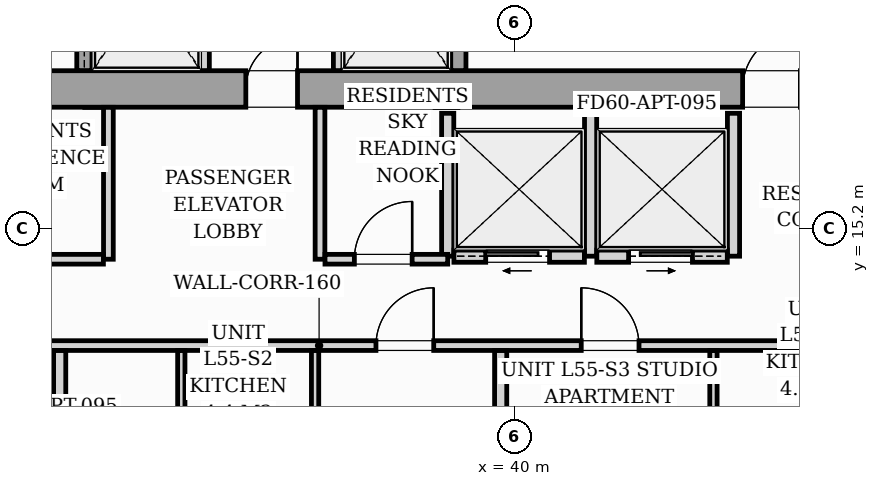
"""IFC4 building model, lengths in metres.
Left out: names, types, materials, properties, quantities, classifications, styles, units other than length and angle.
Written with IfcOpenShell. Run it as: python <this file> out.ifc"""

import sys

from ifc_helpers import new_model, si_unit, direction, frame, frame_2d, origin, origin_2d, place, context, subcontext, project, spatial, rectangle, i_section, extrude, source, transform, mapped, element, fill, save


model = new_model("IFC4")
c1 = context("Model", 3, precision=1e-05, world=origin(), true_north=direction((0.0, 1.0)))
c2 = subcontext(c1, "Body", "Model", "MODEL_VIEW")
j1 = project(units=[si_unit("LENGTHUNIT", "METRE"), si_unit("PLANEANGLEUNIT", "RADIAN")], contexts=[c1])
p1 = place(None, origin())
s1 = spatial("IfcSite", under=j1, at=p1, CompositionType="ELEMENT")
p2 = place(p1, origin())
s2 = spatial("IfcBuilding", under=s1, at=p2, CompositionType="ELEMENT")
p3 = place(p2, frame((0.0, 0.0, 192.2)))
s3 = spatial("IfcBuildingStorey", under=s2, at=p3, CompositionType="ELEMENT", Elevation=192.2)
m1 = source(origin(), c2, "Body", "SweptSolid", [
    extrude(i_section(OverallWidth=0.416, OverallDepth=0.446, WebThickness=0.039, FlangeThickness=0.063, FilletRadius=0.018, at=origin_2d()), origin(), (0.0, 0.0, 1.0), 3.196),
])
for number, where, z_axis, x_axis in (
    (1, (33.12, 17.4, 0.002), (0.0, 0.0, 1.0), (1.0, 0.0, 0.0)),
    (2, (38.88, 17.4, 0.002), (0.0, 0.0, 1.0), (1.0, 0.0, 0.0)),
):
    element("IfcColumn", number, at=place(p3, frame(where, z_axis=z_axis, x_axis=x_axis)), inside=s3, PredefinedType="PILASTER", context=c2, shape_type="MappedRepresentation", body=[
        mapped(m1, transform((0.0, 0.0, 0.0), scale=1.0)),
    ])
p4 = place(p3, frame((26.2, 17.5, 0.0), z_axis=(0.0, 0.0, 1.0), x_axis=(1.0, 0.0, 0.0)))
e3 = element("IfcWall", 3, at=p4, inside=s3, PredefinedType="SHEAR", context=c2, shape_type="SweptSolid", body=[
    extrude(rectangle(XDim=19.6, YDim=0.6, at=frame_2d((9.8, 0.0))), origin(), (0.0, 0.0, 1.0), 3.2),
])
p5 = place(p4, frame((0.95, 0.0, 0.0)))
e4 = element("IfcOpeningElement", 4, at=p5, cuts=e3, PredefinedType="OPENING", context=c2, shape_type="SweptSolid", body=[
    extrude(rectangle(XDim=0.95, YDim=2.06, at=frame_2d((0.475, 1.03))), frame((0.0, 0.31, 0.0), z_axis=(0.0, -1.0, 0.0), x_axis=(1.0, 0.0, 0.0)), (0.0, 0.0, 1.0), 0.62),
])
p6 = place(p4, frame((9.38, 0.0, 0.0)))
e5 = element("IfcOpeningElement", 5, at=p6, cuts=e3, PredefinedType="OPENING", context=c2, shape_type="SweptSolid", body=[
    extrude(rectangle(XDim=0.85, YDim=2.0, at=frame_2d((0.425, 1.0))), frame((0.0, 0.31, 0.0), z_axis=(0.0, -1.0, 0.0), x_axis=(1.0, 0.0, 0.0)), (0.0, 0.0, 1.0), 0.62),
])
p7 = place(p4, frame((17.55, 0.0, 0.0)))
e6 = element("IfcOpeningElement", 6, at=p7, cuts=e3, PredefinedType="OPENING", context=c2, shape_type="SweptSolid", body=[
    extrude(rectangle(XDim=0.95, YDim=2.06, at=frame_2d((0.475, 1.03))), frame((0.0, 0.31, 0.0), z_axis=(0.0, -1.0, 0.0), x_axis=(1.0, 0.0, 0.0)), (0.0, 0.0, 1.0), 0.62),
])
p8 = place(p3, frame((32.925, 17.802, 0.0), z_axis=(0.0, 0.0, 1.0), x_axis=(0.0, 1.0, 0.0)))
e7 = element("IfcWall", 7, at=p8, inside=s3, PredefinedType="SOLIDWALL", context=c2, shape_type="SweptSolid", body=[
    extrude(rectangle(XDim=2.646, YDim=0.25, at=frame_2d((1.323, 0.0))), origin(), (0.0, 0.0, 1.0), 3.2),
])
p9 = place(p8, frame((0.548, 0.0, 0.0)))
e8 = element("IfcOpeningElement", 8, at=p9, cuts=e7, PredefinedType="OPENING", context=c2, shape_type="SweptSolid", body=[
    extrude(rectangle(XDim=1.1, YDim=2.08, at=frame_2d((0.55, 1.04))), frame((0.0, 0.135, 0.0), z_axis=(0.0, -1.0, 0.0), x_axis=(1.0, 0.0, 0.0)), (0.0, 0.0, 1.0), 0.27),
])
for number, where, z_axis, x_axis in (
    (9, (34.9, 17.802, 0.0), (0.0, 0.0, 1.0), (0.0, 1.0, 0.0)),
    (10, (37.1, 17.802, 0.0), (0.0, 0.0, 1.0), (0.0, 1.0, 0.0)),
):
    element("IfcWall", number, at=place(p3, frame(where, z_axis=z_axis, x_axis=x_axis)), inside=s3, PredefinedType="PARTITIONING", context=c2, shape_type="SweptSolid", body=[
        extrude(rectangle(XDim=2.646, YDim=0.16, at=frame_2d((1.323, 0.0))), origin(), (0.0, 0.0, 1.0), 2.94),
    ])
p10 = place(p3, frame((39.075, 17.802, 0.0), z_axis=(0.0, 0.0, 1.0), x_axis=(0.0, 1.0, 0.0)))
e11 = element("IfcWall", 11, at=p10, inside=s3, PredefinedType="SOLIDWALL", context=c2, shape_type="SweptSolid", body=[
    extrude(rectangle(XDim=2.646, YDim=0.25, at=frame_2d((1.323, 0.0))), origin(), (0.0, 0.0, 1.0), 3.2),
])
p11 = place(p10, frame((0.548, 0.0, 0.0)))
e12 = element("IfcOpeningElement", 12, at=p11, cuts=e11, PredefinedType="OPENING", context=c2, shape_type="SweptSolid", body=[
    extrude(rectangle(XDim=1.1, YDim=2.08, at=frame_2d((0.55, 1.04))), frame((0.0, 0.135, 0.0), z_axis=(0.0, -1.0, 0.0), x_axis=(1.0, 0.0, 0.0)), (0.0, 0.0, 1.0), 0.27),
])
for number, where, z_axis, x_axis in (
    (13, (38.9, 14.75, 0.0), (0.0, 0.0, 1.0), (0.0, 1.0, 0.0)),
    (14, (41.25, 14.75, 0.0), (0.0, 0.0, 1.0), (0.0, 1.0, 0.0)),
    (15, (43.6, 14.75, 0.0), (0.0, 0.0, 1.0), (0.0, 1.0, 0.0)),
):
    element("IfcWall", number, at=place(p3, frame(where, z_axis=z_axis, x_axis=x_axis)), inside=s3, PredefinedType="PARTITIONING", context=c2, shape_type="SweptSolid", body=[
        extrude(rectangle(XDim=2.35, YDim=0.2, at=frame_2d((1.175, 0.0))), origin(), (0.0, 0.0, 1.0), 2.94),
    ])
p12 = place(p3, frame((39.002, 14.75, 0.0), z_axis=(0.0, 0.0, 1.0), x_axis=(1.0, 0.0, 0.0)))
e16 = element("IfcWall", 16, at=p12, inside=s3, PredefinedType="PARTITIONING", context=c2, shape_type="SweptSolid", body=[
    extrude(rectangle(XDim=2.146, YDim=0.2, at=frame_2d((1.073, 0.0))), origin(), (0.0, 0.0, 1.0), 2.94),
])
p13 = place(p12, frame((0.523, 0.0, 0.0)))
e17 = element("IfcOpeningElement", 17, at=p13, cuts=e16, PredefinedType="OPENING", context=c2, shape_type="SweptSolid", body=[
    extrude(rectangle(XDim=1.05, YDim=2.08, at=frame_2d((0.525, 1.04))), frame((0.0, 0.11, 0.0), z_axis=(0.0, -1.0, 0.0), x_axis=(1.0, 0.0, 0.0)), (0.0, 0.0, 1.0), 0.22),
])
p14 = place(p3, frame((41.352, 14.75, 0.0), z_axis=(0.0, 0.0, 1.0), x_axis=(1.0, 0.0, 0.0)))
e18 = element("IfcWall", 18, at=p14, inside=s3, PredefinedType="PARTITIONING", context=c2, shape_type="SweptSolid", body=[
    extrude(rectangle(XDim=2.146, YDim=0.2, at=frame_2d((1.073, 0.0))), origin(), (0.0, 0.0, 1.0), 2.94),
])
p15 = place(p14, frame((0.523, 0.0, 0.0)))
e19 = element("IfcOpeningElement", 19, at=p15, cuts=e18, PredefinedType="OPENING", context=c2, shape_type="SweptSolid", body=[
    extrude(rectangle(XDim=1.05, YDim=2.08, at=frame_2d((0.525, 1.04))), frame((0.0, 0.11, 0.0), z_axis=(0.0, -1.0, 0.0), x_axis=(1.0, 0.0, 0.0)), (0.0, 0.0, 1.0), 0.22),
])
p16 = place(p3, frame((26.12, 13.28, 0.0), z_axis=(0.0, 0.0, 1.0), x_axis=(1.0, 0.0, 0.0)))
e20 = element("IfcWall", 20, at=p16, inside=s3, PredefinedType="PARTITIONING", context=c2, shape_type="SweptSolid", body=[
    extrude(rectangle(XDim=21.33, YDim=0.16, at=frame_2d((10.665, 0.0))), origin(), (0.0, 0.0, 1.0), 2.94),
])
p17 = place(p16, frame((4.704, 0.0, 0.0)))
e21 = element("IfcOpeningElement", 21, at=p17, cuts=e20, PredefinedType="OPENING", context=c2, shape_type="SweptSolid", body=[
    extrude(rectangle(XDim=0.95, YDim=2.06, at=frame_2d((0.475, 1.03))), frame((0.0, 0.09, 0.0), z_axis=(0.0, -1.0, 0.0), x_axis=(1.0, 0.0, 0.0)), (0.0, 0.0, 1.0), 0.18),
])
p18 = place(p16, frame((11.6, 0.0, 0.0)))
e22 = element("IfcOpeningElement", 22, at=p18, cuts=e20, PredefinedType="OPENING", context=c2, shape_type="SweptSolid", body=[
    extrude(rectangle(XDim=0.95, YDim=2.06, at=frame_2d((0.475, 1.03))), frame((0.0, 0.09, 0.0), z_axis=(0.0, -1.0, 0.0), x_axis=(1.0, 0.0, 0.0)), (0.0, 0.0, 1.0), 0.18),
])
p19 = place(p16, frame((14.976, 0.0, 0.0)))
e23 = element("IfcOpeningElement", 23, at=p19, cuts=e20, PredefinedType="OPENING", context=c2, shape_type="SweptSolid", body=[
    extrude(rectangle(XDim=0.95, YDim=2.06, at=frame_2d((0.475, 1.03))), frame((0.0, 0.09, 0.0), z_axis=(0.0, -1.0, 0.0), x_axis=(1.0, 0.0, 0.0)), (0.0, 0.0, 1.0), 0.18),
])
p20 = place(p3, frame((32.519, 7.877, 0.0), z_axis=(0.0, 0.0, 1.0), x_axis=(0.0, 1.0, 0.0)))
e24 = element("IfcWall", 24, at=p20, inside=s3, PredefinedType="PARTITIONING", context=c2, shape_type="SweptSolid", body=[
    extrude(rectangle(XDim=5.321, YDim=0.2, at=frame_2d((2.66, 0.0))), origin(), (0.0, 0.0, 1.0), 2.94),
])
for number, where, z_axis, x_axis in (
    (25, (36.719, 11.092, 0.0), (0.0, 0.0, 1.0), (0.0, 1.0, 0.0)),
    (26, (34.519, 11.092, 0.0), (0.0, 0.0, 1.0), (0.0, 1.0, 0.0)),
):
    element("IfcWall", number, at=place(p3, frame(where, z_axis=z_axis, x_axis=x_axis)), inside=s3, PredefinedType="PARTITIONING", context=c2, shape_type="SweptSolid", body=[
        extrude(rectangle(XDim=2.106, YDim=0.12, at=frame_2d((1.053, 0.0))), origin(), (0.0, 0.0, 1.0), 2.94),
    ])
p21 = place(p3, frame((39.771, 8.393, 0.0), z_axis=(0.0, 0.0, 1.0), x_axis=(0.0, 1.0, 0.0)))
e27 = element("IfcWall", 27, at=p21, inside=s3, PredefinedType="PARTITIONING", context=c2, shape_type="SweptSolid", body=[
    extrude(rectangle(XDim=4.805, YDim=0.2, at=frame_2d((2.403, 0.0))), origin(), (0.0, 0.0, 1.0), 2.94),
])
p22 = place(p3, frame((43.27, 11.234, 0.0), z_axis=(0.0, 0.0, 1.0), x_axis=(0.0, 1.0, 0.0)))
e28 = element("IfcWall", 28, at=p22, inside=s3, PredefinedType="PARTITIONING", context=c2, shape_type="SweptSolid", body=[
    extrude(rectangle(XDim=1.964, YDim=0.12, at=frame_2d((0.982, 0.0))), origin(), (0.0, 0.0, 1.0), 2.94),
])
p23 = place(p3, frame((33.32, 14.7, 0.0), z_axis=(0.0, 0.0, 1.0), x_axis=(0.0, 1.0, 0.0)))
e29 = element("IfcWall", 29, at=p23, inside=s3, PredefinedType="PARTITIONING", context=c2, shape_type="SweptSolid", body=[
    extrude(rectangle(XDim=2.498, YDim=0.16, at=frame_2d((1.249, 0.0))), origin(), (0.0, 0.0, 1.0), 2.94),
])
p24 = place(p3, frame((28.442, 14.7, 0.0), z_axis=(0.0, 0.0, 1.0), x_axis=(1.0, 0.0, 0.0)))
e30 = element("IfcWall", 30, at=p24, inside=s3, PredefinedType="PARTITIONING", context=c2, shape_type="SweptSolid", body=[
    extrude(rectangle(XDim=4.796, YDim=0.16, at=frame_2d((2.398, 0.0))), origin(), (0.0, 0.0, 1.0), 2.94),
])
p25 = place(p24, frame((1.923, 0.0, 0.0)))
e31 = element("IfcOpeningElement", 31, at=p25, cuts=e30, PredefinedType="OPENING", context=c2, shape_type="SweptSolid", body=[
    extrude(rectangle(XDim=0.95, YDim=2.06, at=frame_2d((0.475, 1.03))), frame((0.0, 0.09, 0.0), z_axis=(0.0, -1.0, 0.0), x_axis=(1.0, 0.0, 0.0)), (0.0, 0.0, 1.0), 0.18),
])
p26 = place(p3, frame((36.8, 14.7, 0.0), z_axis=(0.0, 0.0, 1.0), x_axis=(0.0, 1.0, 0.0)))
e32 = element("IfcWall", 32, at=p26, inside=s3, PredefinedType="PARTITIONING", context=c2, shape_type="SweptSolid", body=[
    extrude(rectangle(XDim=2.498, YDim=0.16, at=frame_2d((1.249, 0.0))), origin(), (0.0, 0.0, 1.0), 2.94),
])
p27 = place(p3, frame((36.882, 14.7, 0.0), z_axis=(0.0, 0.0, 1.0), x_axis=(1.0, 0.0, 0.0)))
e33 = element("IfcWall", 33, at=p27, inside=s3, PredefinedType="PARTITIONING", context=c2, shape_type="SweptSolid", body=[
    extrude(rectangle(XDim=2.018, YDim=0.16, at=frame_2d((1.009, 0.0))), origin(), (0.0, 0.0, 1.0), 2.94),
])
p28 = place(p27, frame((0.483, 0.0, 0.0)))
e34 = element("IfcOpeningElement", 34, at=p28, cuts=e33, PredefinedType="OPENING", context=c2, shape_type="SweptSolid", body=[
    extrude(rectangle(XDim=0.95, YDim=2.06, at=frame_2d((0.475, 1.03))), frame((0.0, 0.09, 0.0), z_axis=(0.0, -1.0, 0.0), x_axis=(1.0, 0.0, 0.0)), (0.0, 0.0, 1.0), 0.18),
])
m2 = source(origin(), c2, "Body", "SweptSolid", [
    extrude(rectangle(XDim=0.85, YDim=2.0, at=frame_2d((0.425, 1.0))), frame((0.0, 0.025, 0.0), z_axis=(0.0, -1.0, 0.0), x_axis=(1.0, 0.0, 0.0)), (0.0, 0.0, 1.0), 0.05),
])
p29 = place(p6, origin())
e35 = element("IfcDoor", 35, at=p29, inside=s3, OperationType="SINGLE_SWING_RIGHT", PredefinedType="DOOR", context=c2, shape_type="MappedRepresentation", body=[
    mapped(m2, transform((0.0, 0.0, 0.0), scale=1.0)),
])
fill(e5, e35)
m3 = source(origin(), c2, "Body", "SweptSolid", [
    extrude(rectangle(XDim=0.95, YDim=2.06, at=frame_2d((0.475, 1.03))), frame((0.0, 0.025, 0.0), z_axis=(0.0, -1.0, 0.0), x_axis=(1.0, 0.0, 0.0)), (0.0, 0.0, 1.0), 0.05),
])
p30 = place(p7, origin())
e36 = element("IfcDoor", 36, at=p30, inside=s3, OperationType="SINGLE_SWING_RIGHT", PredefinedType="DOOR", context=c2, shape_type="MappedRepresentation", body=[
    mapped(m3, transform((0.0, 0.0, 0.0), scale=1.0)),
])
fill(e6, e36)
m4 = source(origin(), c2, "Body", "SweptSolid", [
    extrude(rectangle(XDim=1.05, YDim=2.08, at=frame_2d((0.525, 1.04))), frame((0.0, 0.025, 0.0), z_axis=(0.0, -1.0, 0.0), x_axis=(1.0, 0.0, 0.0)), (0.0, 0.0, 1.0), 0.05),
])
p31 = place(p13, origin())
e37 = element("IfcDoor", 37, at=p31, inside=s3, OperationType="SLIDING_TO_LEFT", PredefinedType="DOOR", context=c2, shape_type="MappedRepresentation", body=[
    mapped(m4, transform((0.0, 0.0, 0.0), scale=1.0)),
])
fill(e17, e37)
p32 = place(p15, origin())
e38 = element("IfcDoor", 38, at=p32, inside=s3, OperationType="SLIDING_TO_RIGHT", PredefinedType="DOOR", context=c2, shape_type="MappedRepresentation", body=[
    mapped(m4, transform((0.0, 0.0, 0.0), scale=1.0)),
])
fill(e19, e38)
m5 = source(origin(), c2, "Body", "SweptSolid", [
    extrude(rectangle(XDim=0.95, YDim=2.06, at=frame_2d((0.475, 1.03))), frame((0.0, 0.025, 0.0), z_axis=(0.0, -1.0, 0.0), x_axis=(1.0, 0.0, 0.0)), (0.0, 0.0, 1.0), 0.05),
])
p33 = place(p18, origin())
e39 = element("IfcDoor", 39, at=p33, inside=s3, OperationType="SINGLE_SWING_RIGHT", PredefinedType="DOOR", context=c2, shape_type="MappedRepresentation", body=[
    mapped(m5, transform((0.0, 0.0, 0.0), scale=1.0)),
])
fill(e22, e39)
p34 = place(p19, origin())
e40 = element("IfcDoor", 40, at=p34, inside=s3, OperationType="SINGLE_SWING_LEFT", PredefinedType="DOOR", context=c2, shape_type="MappedRepresentation", body=[
    mapped(m5, transform((0.0, 0.0, 0.0), scale=1.0)),
])
fill(e23, e40)
p35 = place(p28, origin())
e41 = element("IfcDoor", 41, at=p35, inside=s3, OperationType="SINGLE_SWING_RIGHT", PredefinedType="DOOR", context=c2, shape_type="MappedRepresentation", body=[
    mapped(m5, transform((0.0, 0.0, 0.0), scale=1.0)),
])
fill(e34, e41)
save(model, sys.argv[1])
